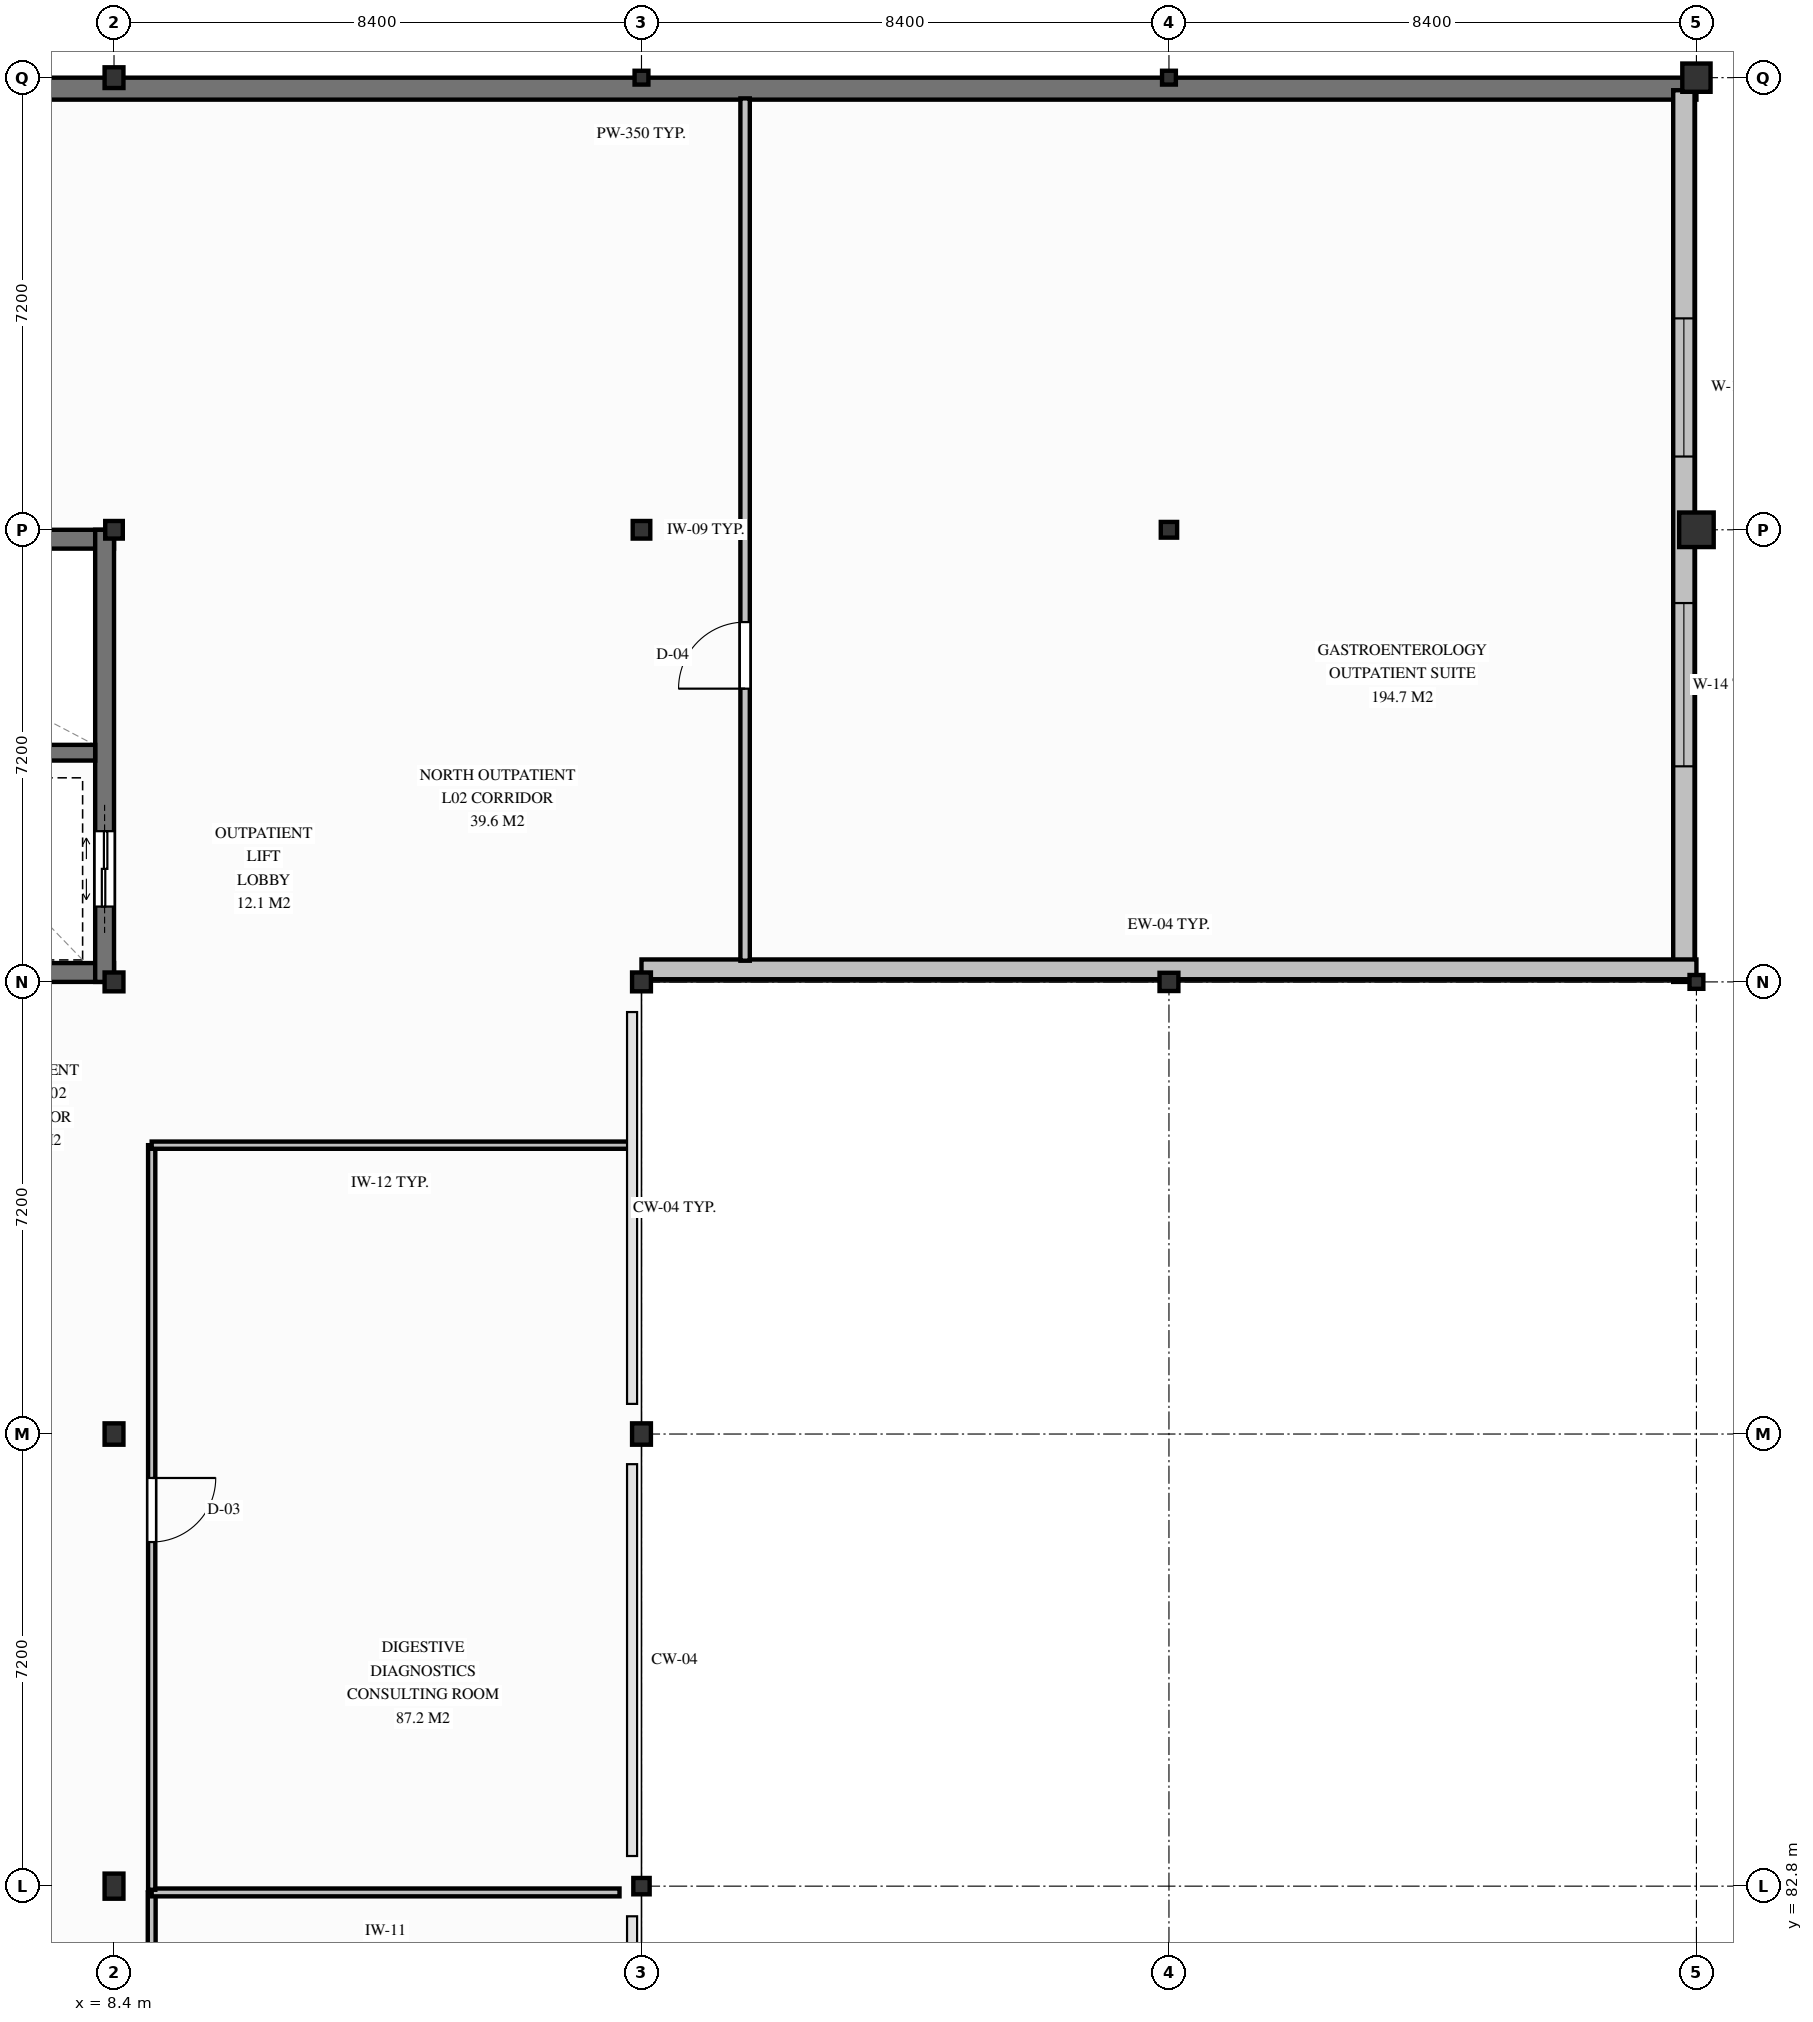
"""IFC4 building model, lengths in metres.
Left out: names, types, materials, properties, quantities, classifications, styles, units other than length and angle.
Written with IfcOpenShell. Run it as: python <this file> out.ifc"""

import sys

from ifc_helpers import new_model, si_unit, direction, frame, frame_2d, origin, origin_2d, place, context, subcontext, project, spatial, rectangle, hollow_rectangle, i_section, extrude, element, fill, save


model = new_model("IFC4")
c1 = context("Model", 3, precision=1e-05, world=origin(), true_north=direction((0.0, 1.0)))
c2 = subcontext(c1, "Body", "Model", "MODEL_VIEW")
j1 = project(units=[si_unit("LENGTHUNIT", "METRE"), si_unit("PLANEANGLEUNIT", "RADIAN")], contexts=[c1])
p1 = place(None, origin())
s1 = spatial("IfcSite", under=j1, at=p1, CompositionType="ELEMENT")
p2 = place(p1, origin())
s2 = spatial("IfcBuilding", under=s1, at=p2, CompositionType="ELEMENT")
p3 = place(p2, frame((0.0, 0.0, 9.0)))
s3 = spatial("IfcBuildingStorey", under=s2, at=p3, CompositionType="ELEMENT", Elevation=9.0)
p4 = place(p3, frame((0.0, 104.25, 0.0), z_axis=(0.0, 0.0, 1.0), x_axis=(1.0, 0.0, 0.0)))
e1 = element("IfcWall", 1, at=p4, inside=s3, PredefinedType="SHEAR", context=c2, shape_type="SweptSolid", body=[
    extrude(rectangle(XDim=8.4, YDim=0.3, at=frame_2d((4.2, 0.0))), origin(), (0.0, 0.0, 1.0), 4.2),
])
p5 = place(p3, frame((0.0, 97.35, 0.0), z_axis=(0.0, 0.0, 1.0), x_axis=(1.0, 0.0, 0.0)))
e2 = element("IfcWall", 2, at=p5, inside=s3, PredefinedType="SHEAR", context=c2, shape_type="SweptSolid", body=[
    extrude(rectangle(XDim=8.4, YDim=0.3, at=frame_2d((4.2, 0.0))), origin(), (0.0, 0.0, 1.0), 4.2),
])
p6 = place(p5, frame((3.0, 0.0, 0.0)))
e3 = element("IfcOpeningElement", 3, at=p6, cuts=e2, PredefinedType="OPENING", context=c2, shape_type="SweptSolid", body=[
    extrude(rectangle(XDim=1.1, YDim=2.15, at=frame_2d((0.55, 1.075))), frame((0.0, 0.16, 0.0), z_axis=(0.0, -1.0, 0.0), x_axis=(1.0, 0.0, 0.0)), (0.0, 0.0, 1.0), 0.32),
])
p7 = place(p3, frame((8.25, 97.2, 0.0), z_axis=(0.0, 0.0, 1.0), x_axis=(0.0, 1.0, 0.0)))
e4 = element("IfcWall", 4, at=p7, inside=s3, PredefinedType="SHEAR", context=c2, shape_type="SweptSolid", body=[
    extrude(rectangle(XDim=7.2, YDim=0.3, at=frame_2d((3.6, 0.0))), origin(), (0.0, 0.0, 1.0), 4.2),
])
p8 = place(p7, frame((1.2, 0.0, 0.0)))
e5 = element("IfcOpeningElement", 5, at=p8, cuts=e4, PredefinedType="OPENING", context=c2, shape_type="SweptSolid", body=[
    extrude(rectangle(XDim=1.2, YDim=2.15, at=frame_2d((0.6, 1.075))), frame((0.0, 0.16, 0.0), z_axis=(0.0, -1.0, 0.0), x_axis=(1.0, 0.0, 0.0)), (0.0, 0.0, 1.0), 0.32),
])
p9 = place(p3, frame((0.3, 100.85, 0.0), z_axis=(0.0, 0.0, 1.0), x_axis=(1.0, 0.0, 0.0)))
e6 = element("IfcWall", 6, at=p9, inside=s3, PredefinedType="SHEAR", context=c2, shape_type="SweptSolid", body=[
    extrude(rectangle(XDim=7.8, YDim=0.25, at=frame_2d((3.9, 0.0))), origin(), (0.0, 0.0, 1.0), 4.2),
])
p10 = place(p9, frame((0.4, 0.0, 0.0)))
e7 = element("IfcOpeningElement", 7, at=p10, cuts=e6, PredefinedType="OPENING", context=c2, shape_type="SweptSolid", body=[
    extrude(rectangle(XDim=1.1, YDim=2.15, at=frame_2d((0.55, 1.075))), frame((0.0, 0.135, 0.0), z_axis=(0.0, -1.0, 0.0), x_axis=(1.0, 0.0, 0.0)), (0.0, 0.0, 1.0), 0.27),
])
p11 = place(p3, frame((0.0, 111.425, 0.0), z_axis=(0.0, 0.0, 1.0), x_axis=(1.0, 0.0, 0.0)))
e8 = element("IfcWall", 8, at=p11, inside=s3, PredefinedType="SHEAR", context=c2, shape_type="SweptSolid", body=[
    extrude(rectangle(XDim=33.6, YDim=0.35, at=frame_2d((16.8, 0.0))), origin(), (0.0, 0.0, 1.0), 4.2),
])
p12 = place(p3, frame((8.4, 82.8, 0.0), z_axis=(0.0, 0.0, 1.0), x_axis=(1.0, 0.0, 0.0)))
e9 = element("IfcColumn", 9, at=p12, inside=s3, PredefinedType="COLUMN", context=c2, shape_type="SweptSolid", body=[
    extrude(i_section(OverallWidth=0.3, OverallDepth=0.4, WebThickness=0.013, FlangeThickness=0.024, FilletRadius=0.027, at=origin_2d()), origin(), (0.0, 0.0, 1.0), 4.2),
])
p13 = place(p3, frame((8.4, 90.0, 0.0), z_axis=(0.0, 0.0, 1.0), x_axis=(1.0, 0.0, 0.0)))
e10 = element("IfcColumn", 10, at=p13, inside=s3, PredefinedType="COLUMN", context=c2, shape_type="SweptSolid", body=[
    extrude(i_section(OverallWidth=0.3, OverallDepth=0.34, WebThickness=0.012, FlangeThickness=0.021, FilletRadius=0.027, at=origin_2d()), origin(), (0.0, 0.0, 1.0), 4.2),
])
p14 = place(p3, frame((8.4, 97.2, 0.0), z_axis=(0.0, 0.0, 1.0), x_axis=(1.0, 0.0, 0.0)))
e11 = element("IfcColumn", 11, at=p14, inside=s3, PredefinedType="COLUMN", context=c2, shape_type="SweptSolid", body=[
    extrude(i_section(OverallWidth=0.3, OverallDepth=0.3, WebThickness=0.011, FlangeThickness=0.019, FilletRadius=0.027, at=origin_2d()), origin(), (0.0, 0.0, 1.0), 4.2),
])
p15 = place(p3, frame((8.4, 104.4, 0.0), z_axis=(0.0, 0.0, 1.0), x_axis=(1.0, 0.0, 0.0)))
e12 = element("IfcColumn", 12, at=p15, inside=s3, PredefinedType="COLUMN", context=c2, shape_type="SweptSolid", body=[
    extrude(i_section(OverallWidth=0.28, OverallDepth=0.28, WebThickness=0.01, FlangeThickness=0.018, FilletRadius=0.024, at=origin_2d()), origin(), (0.0, 0.0, 1.0), 4.2),
])
p16 = place(p3, frame((8.4, 111.6, 0.0), z_axis=(0.0, 0.0, 1.0), x_axis=(1.0, 0.0, 0.0)))
e13 = element("IfcColumn", 13, at=p16, inside=s3, PredefinedType="COLUMN", context=c2, shape_type="SweptSolid", body=[
    extrude(i_section(OverallWidth=0.3, OverallDepth=0.33, WebThickness=0.01, FlangeThickness=0.017, FilletRadius=0.027, at=origin_2d()), origin(), (0.0, 0.0, 1.0), 4.2),
])
p17 = place(p3, frame((16.8, 82.8, 0.0), z_axis=(0.0, 0.0, 1.0), x_axis=(1.0, 0.0, 0.0)))
e14 = element("IfcColumn", 14, at=p17, inside=s3, PredefinedType="COLUMN", context=c2, shape_type="SweptSolid", body=[
    extrude(i_section(OverallWidth=0.26, OverallDepth=0.26, WebThickness=0.01, FlangeThickness=0.018, FilletRadius=0.024, at=origin_2d()), origin(), (0.0, 0.0, 1.0), 4.2),
])
p18 = place(p3, frame((16.8, 90.0, 0.0), z_axis=(0.0, 0.0, 1.0), x_axis=(1.0, 0.0, 0.0)))
e15 = element("IfcColumn", 15, at=p18, inside=s3, PredefinedType="COLUMN", context=c2, shape_type="SweptSolid", body=[
    extrude(i_section(OverallWidth=0.3, OverallDepth=0.34, WebThickness=0.012, FlangeThickness=0.021, FilletRadius=0.027, at=origin_2d()), origin(), (0.0, 0.0, 1.0), 4.2),
])
p19 = place(p3, frame((16.8, 97.2, 0.0), z_axis=(0.0, 0.0, 1.0), x_axis=(1.0, 0.0, 0.0)))
e16 = element("IfcColumn", 16, at=p19, inside=s3, PredefinedType="COLUMN", context=c2, shape_type="SweptSolid", body=[
    extrude(i_section(OverallWidth=0.3, OverallDepth=0.3, WebThickness=0.011, FlangeThickness=0.019, FilletRadius=0.027, at=origin_2d()), origin(), (0.0, 0.0, 1.0), 4.2),
])
p20 = place(p3, frame((16.8, 104.4, 0.0), z_axis=(0.0, 0.0, 1.0), x_axis=(1.0, 0.0, 0.0)))
e17 = element("IfcColumn", 17, at=p20, inside=s3, PredefinedType="COLUMN", context=c2, shape_type="SweptSolid", body=[
    extrude(i_section(OverallWidth=0.28, OverallDepth=0.28, WebThickness=0.01, FlangeThickness=0.018, FilletRadius=0.024, at=origin_2d()), origin(), (0.0, 0.0, 1.0), 4.2),
])
p21 = place(p3, frame((16.8, 111.6, 0.0), z_axis=(0.0, 0.0, 1.0), x_axis=(1.0, 0.0, 0.0)))
e18 = element("IfcColumn", 18, at=p21, inside=s3, PredefinedType="COLUMN", context=c2, shape_type="SweptSolid", body=[
    extrude(hollow_rectangle(XDim=0.22, YDim=0.22, WallThickness=0.012, InnerFilletRadius=0.019, OuterFilletRadius=0.031, at=origin_2d()), origin(), (0.0, 0.0, 1.0), 4.2),
])
p22 = place(p3, frame((25.2, 97.2, 0.0), z_axis=(0.0, 0.0, 1.0), x_axis=(1.0, 0.0, 0.0)))
e19 = element("IfcColumn", 19, at=p22, inside=s3, PredefinedType="COLUMN", context=c2, shape_type="SweptSolid", body=[
    extrude(i_section(OverallWidth=0.3, OverallDepth=0.29, WebThickness=0.009, FlangeThickness=0.014, FilletRadius=0.027, at=origin_2d()), origin(), (0.0, 0.0, 1.0), 4.2),
])
p23 = place(p3, frame((25.2, 104.4, 0.0), z_axis=(0.0, 0.0, 1.0), x_axis=(1.0, 0.0, 0.0)))
e20 = element("IfcColumn", 20, at=p23, inside=s3, PredefinedType="COLUMN", context=c2, shape_type="SweptSolid", body=[
    extrude(i_section(OverallWidth=0.26, OverallDepth=0.25, WebThickness=0.008, FlangeThickness=0.012, FilletRadius=0.024, at=origin_2d()), origin(), (0.0, 0.0, 1.0), 4.2),
])
for number, where, z_axis, x_axis in (
    (21, (25.2, 111.6, 0.0), (0.0, 0.0, 1.0), (1.0, 0.0, 0.0)),
    (22, (33.6, 97.2, 0.0), (0.0, 0.0, 1.0), (1.0, 0.0, 0.0)),
):
    element("IfcColumn", number, at=place(p3, frame(where, z_axis=z_axis, x_axis=x_axis)), inside=s3, PredefinedType="COLUMN", context=c2, shape_type="SweptSolid", body=[
        extrude(hollow_rectangle(XDim=0.22, YDim=0.22, WallThickness=0.012, InnerFilletRadius=0.019, OuterFilletRadius=0.031, at=origin_2d()), origin(), (0.0, 0.0, 1.0), 4.2),
    ])
p24 = place(p3, frame((33.6, 104.4, 0.0), z_axis=(0.0, 0.0, 1.0), x_axis=(1.0, 0.0, 0.0)))
e23 = element("IfcColumn", 23, at=p24, inside=s3, PredefinedType="COLUMN", context=c2, shape_type="SweptSolid", body=[
    extrude(rectangle(XDim=0.55, YDim=0.55, at=origin_2d()), origin(), (0.0, 0.0, 1.0), 4.2),
])
p25 = place(p3, frame((33.6, 111.6, 0.0), z_axis=(0.0, 0.0, 1.0), x_axis=(1.0, 0.0, 0.0)))
e24 = element("IfcColumn", 24, at=p25, inside=s3, PredefinedType="COLUMN", context=c2, shape_type="SweptSolid", body=[
    extrude(rectangle(XDim=0.45, YDim=0.45, at=origin_2d()), origin(), (0.0, 0.0, 1.0), 4.2),
])
p26 = place(p3, frame((33.4, 111.4, 0.0), z_axis=(0.0, 0.0, 1.0), x_axis=(0.0, -1.0, 0.0)))
e25 = element("IfcWall", 25, at=p26, inside=s3, PredefinedType="SOLIDWALL", context=c2, shape_type="SweptSolid", body=[
    extrude(rectangle(XDim=14.2, YDim=0.34, at=frame_2d((7.1, 0.0))), origin(), (0.0, 0.0, 1.0), 3.628),
])
p27 = place(p26, frame((3.633, 0.0, 0.85)))
e26 = element("IfcOpeningElement", 26, at=p27, cuts=e25, PredefinedType="OPENING", context=c2, shape_type="SweptSolid", body=[
    extrude(rectangle(XDim=2.2, YDim=1.85, at=frame_2d((1.1, 0.925))), frame((0.0, 0.18, 0.0), z_axis=(0.0, -1.0, 0.0), x_axis=(1.0, 0.0, 0.0)), (0.0, 0.0, 1.0), 0.36),
])
p28 = place(p26, frame((8.167, 0.0, 0.85)))
e27 = element("IfcOpeningElement", 27, at=p28, cuts=e25, PredefinedType="OPENING", context=c2, shape_type="SweptSolid", body=[
    extrude(rectangle(XDim=2.6, YDim=2.1, at=frame_2d((1.3, 1.05))), frame((0.0, 0.18, 0.0), z_axis=(0.0, -1.0, 0.0), x_axis=(1.0, 0.0, 0.0)), (0.0, 0.0, 1.0), 0.36),
])
p29 = place(p3, frame((33.6, 97.4, 0.0), z_axis=(0.0, 0.0, 1.0), x_axis=(-1.0, 0.0, 0.0)))
e28 = element("IfcWall", 28, at=p29, inside=s3, PredefinedType="SOLIDWALL", context=c2, shape_type="SweptSolid", body=[
    extrude(rectangle(XDim=16.8, YDim=0.315, at=frame_2d((8.4, 0.0))), origin(), (0.0, 0.0, 1.0), 3.588),
])
p30 = place(p3, frame((18.45, 97.538, 0.0), z_axis=(0.0, 0.0, 1.0), x_axis=(0.0, 1.0, 0.0)))
e29 = element("IfcWall", 29, at=p30, inside=s3, PredefinedType="PARTITIONING", context=c2, shape_type="SweptSolid", body=[
    extrude(rectangle(XDim=13.732, YDim=0.15, at=frame_2d((6.866, 0.0))), origin(), (0.0, 0.0, 1.0), 3.658),
])
p31 = place(p30, frame((4.333, 0.0, 0.0)))
e30 = element("IfcOpeningElement", 30, at=p31, cuts=e29, PredefinedType="OPENING", context=c2, shape_type="SweptSolid", body=[
    extrude(rectangle(XDim=1.06, YDim=2.16, at=frame_2d((0.53, 1.08))), frame((0.0, 0.085, 0.0), z_axis=(0.0, -1.0, 0.0), x_axis=(1.0, 0.0, 0.0)), (0.0, 0.0, 1.0), 0.17),
])
p32 = place(p3, frame((9.0, 82.7, 0.0), z_axis=(0.0, 0.0, 1.0), x_axis=(0.0, -1.0, 0.0)))
e31 = element("IfcWall", 31, at=p32, inside=s3, PredefinedType="PARTITIONING", context=c2, shape_type="SweptSolid", body=[
    extrude(rectangle(XDim=16.43, YDim=0.125, at=frame_2d((8.215, 0.0))), origin(), (0.0, 0.0, 1.0), 3.478),
])
p33 = place(p32, frame((8.4, 0.0, 0.0)))
e32 = element("IfcOpeningElement", 32, at=p33, cuts=e31, PredefinedType="OPENING", context=c2, shape_type="SweptSolid", body=[
    extrude(rectangle(XDim=1.12, YDim=2.18, at=frame_2d((0.56, 1.09))), frame((0.0, 0.073, 0.0), z_axis=(0.0, -1.0, 0.0), x_axis=(1.0, 0.0, 0.0)), (0.0, 0.0, 1.0), 0.145),
])
p34 = place(p3, frame((16.45, 82.7, 0.0), z_axis=(0.0, 0.0, 1.0), x_axis=(-1.0, 0.0, 0.0)))
e33 = element("IfcWall", 33, at=p34, inside=s3, PredefinedType="PARTITIONING", context=c2, shape_type="SweptSolid", body=[
    extrude(rectangle(XDim=7.45, YDim=0.125, at=frame_2d((3.725, 0.0))), origin(), (0.0, 0.0, 1.0), 3.488),
])
p35 = place(p3, frame((9.0, 94.6, 0.0), z_axis=(0.0, 0.0, 1.0), x_axis=(0.0, -1.0, 0.0)))
e34 = element("IfcWall", 34, at=p35, inside=s3, PredefinedType="PARTITIONING", context=c2, shape_type="SweptSolid", body=[
    extrude(rectangle(XDim=11.858, YDim=0.115, at=frame_2d((5.929, 0.0))), origin(), (0.0, 0.0, 1.0), 3.488),
])
p36 = place(p35, frame((5.3, 0.0, 0.0)))
e35 = element("IfcOpeningElement", 35, at=p36, cuts=e34, PredefinedType="OPENING", context=c2, shape_type="SweptSolid", body=[
    extrude(rectangle(XDim=1.02, YDim=2.15, at=frame_2d((0.51, 1.075))), frame((0.0, 0.067, 0.0), z_axis=(0.0, -1.0, 0.0), x_axis=(1.0, 0.0, 0.0)), (0.0, 0.0, 1.0), 0.135),
])
p37 = place(p3, frame((16.59, 94.6, 0.0), z_axis=(0.0, 0.0, 1.0), x_axis=(-1.0, 0.0, 0.0)))
e36 = element("IfcWall", 36, at=p37, inside=s3, PredefinedType="PARTITIONING", context=c2, shape_type="SweptSolid", body=[
    extrude(rectangle(XDim=7.59, YDim=0.115, at=frame_2d((3.795, 0.0))), origin(), (0.0, 0.0, 1.0), 3.588),
])
p38 = place(p27, origin())
e37 = element("IfcWindow", 37, at=p38, inside=s3, PartitioningType="SINGLE_PANEL", PredefinedType="WINDOW", context=c2, shape_type="SweptSolid", body=[
    extrude(rectangle(XDim=2.2, YDim=1.85, at=frame_2d((1.1, 0.925))), frame((0.0, 0.03, 0.0), z_axis=(0.0, -1.0, 0.0), x_axis=(1.0, 0.0, 0.0)), (0.0, 0.0, 1.0), 0.06),
])
fill(e26, e37)
p39 = place(p28, origin())
e38 = element("IfcWindow", 38, at=p39, inside=s3, PartitioningType="SINGLE_PANEL", PredefinedType="WINDOW", context=c2, shape_type="SweptSolid", body=[
    extrude(rectangle(XDim=2.6, YDim=2.1, at=frame_2d((1.3, 1.05))), frame((0.0, 0.03, 0.0), z_axis=(0.0, -1.0, 0.0), x_axis=(1.0, 0.0, 0.0)), (0.0, 0.0, 1.0), 0.06),
])
fill(e27, e38)
p40 = place(p8, origin())
e39 = element("IfcDoor", 39, at=p40, inside=s3, OperationType="DOUBLE_DOOR_SLIDING", PredefinedType="DOOR", context=c2, shape_type="SweptSolid", body=[
    extrude(rectangle(XDim=1.2, YDim=2.15, at=frame_2d((0.6, 1.075))), frame((0.0, 0.025, 0.0), z_axis=(0.0, -1.0, 0.0), x_axis=(1.0, 0.0, 0.0)), (0.0, 0.0, 1.0), 0.05),
])
fill(e5, e39)
p41 = place(p31, origin())
e40 = element("IfcDoor", 40, at=p41, inside=s3, OperationType="SINGLE_SWING_LEFT", PredefinedType="DOOR", context=c2, shape_type="SweptSolid", body=[
    extrude(rectangle(XDim=1.06, YDim=2.16, at=frame_2d((0.53, 1.08))), frame((0.0, 0.025, 0.0), z_axis=(0.0, -1.0, 0.0), x_axis=(1.0, 0.0, 0.0)), (0.0, 0.0, 1.0), 0.05),
])
fill(e30, e40)
p42 = place(p36, origin())
e41 = element("IfcDoor", 41, at=p42, inside=s3, OperationType="SINGLE_SWING_LEFT", PredefinedType="DOOR", context=c2, shape_type="SweptSolid", body=[
    extrude(rectangle(XDim=1.02, YDim=2.15, at=frame_2d((0.51, 1.075))), frame((0.0, 0.025, 0.0), z_axis=(0.0, -1.0, 0.0), x_axis=(1.0, 0.0, 0.0)), (0.0, 0.0, 1.0), 0.05),
])
fill(e35, e41)
save(model, sys.argv[1])
